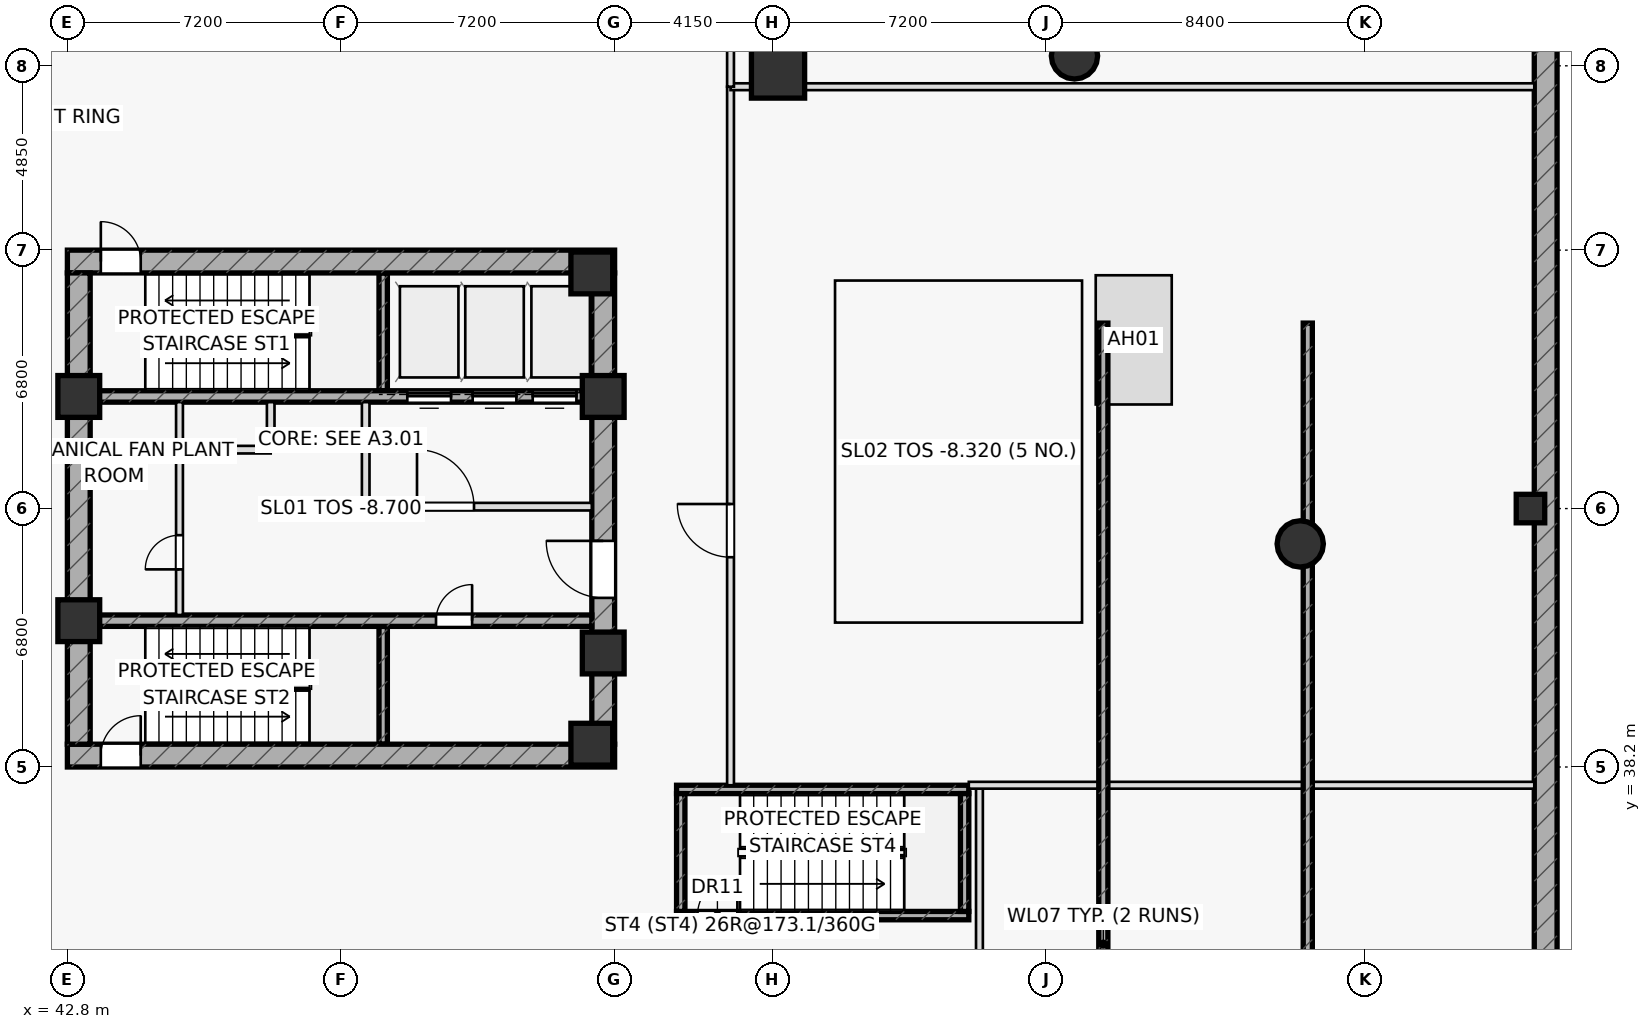
"""IFC4 building model, lengths in metres.
Left out: names, types, materials, properties, quantities, classifications, styles, units other than length and angle.
Written with IfcOpenShell. Run it as: python <this file> out.ifc"""

import sys

from ifc_helpers import new_model, si_unit, direction, frame, frame_2d, origin, origin_2d, place, context, subcontext, project, spatial, rectangle, hollow_circle, extrude, element, fill, save


model = new_model("IFC4")
c1 = context("Model", 3, precision=1e-05, world=origin(), true_north=direction((0.0, 1.0)))
c2 = subcontext(c1, "Body", "Model", "MODEL_VIEW")
j1 = project(units=[si_unit("LENGTHUNIT", "METRE"), si_unit("PLANEANGLEUNIT", "RADIAN")], contexts=[c1])
p1 = place(None, origin())
s1 = spatial("IfcSite", under=j1, at=p1, CompositionType="ELEMENT")
p2 = place(p1, origin())
s2 = spatial("IfcBuilding", under=s1, at=p2, CompositionType="ELEMENT")
p3 = place(p2, frame((0.0, 0.0, -8.7)))
s3 = spatial("IfcBuildingStorey", under=s2, at=p3, CompositionType="ELEMENT", Elevation=-8.7)
for number, where, z_axis, x_axis in (
    (1, (51.11, 48.1, 0.0), (0.0, 0.0, 1.0), (0.0, 1.0, 0.0)),
    (2, (51.11, 38.8, 0.0), (0.0, 0.0, 1.0), (0.0, 1.0, 0.0)),
):
    element("IfcWall", number, at=place(p3, frame(where, z_axis=z_axis, x_axis=x_axis)), inside=s3, PredefinedType="SHEAR", context=c2, shape_type="SweptSolid", body=[
        extrude(rectangle(XDim=3.1, YDim=0.22, at=frame_2d((1.55, 0.0))), origin(), (0.0, 0.0, 1.0), 4.15),
    ])
p4 = place(p3, frame((58.83, 34.29, 0.0), z_axis=(0.0, 0.0, 1.0), x_axis=(1.0, 0.0, 0.0)))
e3 = element("IfcWall", 3, at=p4, inside=s3, PredefinedType="SHEAR", context=c2, shape_type="SweptSolid", body=[
    extrude(rectangle(XDim=7.69, YDim=0.22, at=frame_2d((3.845, 0.0))), origin(), (0.0, 0.0, 1.0), 4.15),
])
p5 = place(p4, frame((0.55, 0.0, 0.0)))
e4 = element("IfcOpeningElement", 4, at=p5, cuts=e3, PredefinedType="OPENING", context=c2, shape_type="SweptSolid", body=[
    extrude(rectangle(XDim=1.05, YDim=2.2, at=frame_2d((0.525, 1.1))), frame((0.0, 0.12, 0.0), z_axis=(0.0, -1.0, 0.0), x_axis=(1.0, 0.0, 0.0)), (0.0, 0.0, 1.0), 0.24),
])
p6 = place(p3, frame((58.83, 37.61, 0.0), z_axis=(0.0, 0.0, 1.0), x_axis=(1.0, 0.0, 0.0)))
e5 = element("IfcWall", 5, at=p6, inside=s3, PredefinedType="SHEAR", context=c2, shape_type="SweptSolid", body=[
    extrude(rectangle(XDim=7.69, YDim=0.22, at=frame_2d((3.845, 0.0))), origin(), (0.0, 0.0, 1.0), 4.15),
])
for number, where, z_axis, x_axis in (
    (6, (66.41, 34.4, 0.0), (0.0, 0.0, 1.0), (0.0, 1.0, 0.0)),
    (7, (58.94, 34.4, 0.0), (0.0, 0.0, 1.0), (0.0, 1.0, 0.0)),
):
    element("IfcWall", number, at=place(p3, frame(where, z_axis=z_axis, x_axis=x_axis)), inside=s3, PredefinedType="SHEAR", context=c2, shape_type="SweptSolid", body=[
        extrude(rectangle(XDim=3.1, YDim=0.22, at=frame_2d((1.55, 0.0))), origin(), (0.0, 0.0, 1.0), 4.15),
    ])
p7 = place(p3, frame((42.8, 51.5, 0.0), z_axis=(0.0, 0.0, 1.0), x_axis=(1.0, 0.0, 0.0)))
e8 = element("IfcWall", 8, at=p7, inside=s3, PredefinedType="SHEAR", context=c2, shape_type="SweptSolid", body=[
    extrude(rectangle(XDim=14.4, YDim=0.6, at=frame_2d((7.2, 0.0))), origin(), (0.0, 0.0, 1.0), 4.15),
])
p8 = place(p7, frame((0.88, 0.0, 0.0)))
e9 = element("IfcOpeningElement", 9, at=p8, cuts=e8, PredefinedType="OPENING", context=c2, shape_type="SweptSolid", body=[
    extrude(rectangle(XDim=1.05, YDim=2.2, at=frame_2d((0.525, 1.1))), frame((0.0, 0.31, 0.0), z_axis=(0.0, -1.0, 0.0), x_axis=(1.0, 0.0, 0.0)), (0.0, 0.0, 1.0), 0.62),
])
p9 = place(p3, frame((42.8, 38.5, 0.0), z_axis=(0.0, 0.0, 1.0), x_axis=(1.0, 0.0, 0.0)))
e10 = element("IfcWall", 10, at=p9, inside=s3, PredefinedType="SHEAR", context=c2, shape_type="SweptSolid", body=[
    extrude(rectangle(XDim=14.4, YDim=0.6, at=frame_2d((7.2, 0.0))), origin(), (0.0, 0.0, 1.0), 4.15),
])
p10 = place(p9, frame((0.88, 0.0, 0.0)))
e11 = element("IfcOpeningElement", 11, at=p10, cuts=e10, PredefinedType="OPENING", context=c2, shape_type="SweptSolid", body=[
    extrude(rectangle(XDim=1.05, YDim=2.2, at=frame_2d((0.525, 1.1))), frame((0.0, 0.31, 0.0), z_axis=(0.0, -1.0, 0.0), x_axis=(1.0, 0.0, 0.0)), (0.0, 0.0, 1.0), 0.62),
])
p11 = place(p3, frame((43.1, 38.8, 0.0), z_axis=(0.0, 0.0, 1.0), x_axis=(0.0, 1.0, 0.0)))
e12 = element("IfcWall", 12, at=p11, inside=s3, PredefinedType="SHEAR", context=c2, shape_type="SweptSolid", body=[
    extrude(rectangle(XDim=12.4, YDim=0.6, at=frame_2d((6.2, 0.0))), origin(), (0.0, 0.0, 1.0), 4.15),
])
p12 = place(p3, frame((56.9, 38.8, 0.0), z_axis=(0.0, 0.0, 1.0), x_axis=(0.0, 1.0, 0.0)))
e13 = element("IfcWall", 13, at=p12, inside=s3, PredefinedType="SHEAR", context=c2, shape_type="SweptSolid", body=[
    extrude(rectangle(XDim=12.4, YDim=0.6, at=frame_2d((6.2, 0.0))), origin(), (0.0, 0.0, 1.0), 4.15),
])
p13 = place(p12, frame((3.85, 0.0, 0.0)))
e14 = element("IfcOpeningElement", 14, at=p13, cuts=e13, PredefinedType="OPENING", context=c2, shape_type="SweptSolid", body=[
    extrude(rectangle(XDim=1.5, YDim=2.2, at=frame_2d((0.75, 1.1))), frame((0.0, 0.31, 0.0), z_axis=(0.0, -1.0, 0.0), x_axis=(1.0, 0.0, 0.0)), (0.0, 0.0, 1.0), 0.62),
])
p14 = place(p3, frame((43.4, 47.95, 0.0), z_axis=(0.0, 0.0, 1.0), x_axis=(1.0, 0.0, 0.0)))
e15 = element("IfcWall", 15, at=p14, inside=s3, PredefinedType="SHEAR", context=c2, shape_type="SweptSolid", body=[
    extrude(rectangle(XDim=13.2, YDim=0.3, at=frame_2d((6.6, 0.0))), origin(), (0.0, 0.0, 1.0), 4.15),
])
p15 = place(p14, frame((8.345, 0.0, 0.0)))
e16 = element("IfcOpeningElement", 16, at=p15, cuts=e15, PredefinedType="OPENING", context=c2, shape_type="SweptSolid", body=[
    extrude(rectangle(XDim=1.15, YDim=2.2, at=frame_2d((0.575, 1.1))), frame((0.0, 0.16, 0.0), z_axis=(0.0, -1.0, 0.0), x_axis=(1.0, 0.0, 0.0)), (0.0, 0.0, 1.0), 0.32),
])
p16 = place(p14, frame((10.065, 0.0, 0.0)))
e17 = element("IfcOpeningElement", 17, at=p16, cuts=e15, PredefinedType="OPENING", context=c2, shape_type="SweptSolid", body=[
    extrude(rectangle(XDim=1.15, YDim=2.2, at=frame_2d((0.575, 1.1))), frame((0.0, 0.16, 0.0), z_axis=(0.0, -1.0, 0.0), x_axis=(1.0, 0.0, 0.0)), (0.0, 0.0, 1.0), 0.32),
])
p17 = place(p14, frame((11.645, 0.0, 0.0)))
e18 = element("IfcOpeningElement", 18, at=p17, cuts=e15, PredefinedType="OPENING", context=c2, shape_type="SweptSolid", body=[
    extrude(rectangle(XDim=1.15, YDim=2.2, at=frame_2d((0.575, 1.1))), frame((0.0, 0.16, 0.0), z_axis=(0.0, -1.0, 0.0), x_axis=(1.0, 0.0, 0.0)), (0.0, 0.0, 1.0), 0.32),
])
p18 = place(p3, frame((43.4, 42.05, 0.0), z_axis=(0.0, 0.0, 1.0), x_axis=(1.0, 0.0, 0.0)))
e19 = element("IfcWall", 19, at=p18, inside=s3, PredefinedType="SHEAR", context=c2, shape_type="SweptSolid", body=[
    extrude(rectangle(XDim=13.2, YDim=0.3, at=frame_2d((6.6, 0.0))), origin(), (0.0, 0.0, 1.0), 4.15),
])
p19 = place(p18, frame((9.1, 0.0, 0.0)))
e20 = element("IfcOpeningElement", 20, at=p19, cuts=e19, PredefinedType="OPENING", context=c2, shape_type="SweptSolid", body=[
    extrude(rectangle(XDim=0.95, YDim=2.05, at=frame_2d((0.475, 1.025))), frame((0.0, 0.16, 0.0), z_axis=(0.0, -1.0, 0.0), x_axis=(1.0, 0.0, 0.0)), (0.0, 0.0, 1.0), 0.32),
])
for number, where, z_axis, x_axis in (
    (21, (43.1, 47.95, 0.0), (0.0, 0.0, 1.0), (1.0, 0.0, 0.0)),
    (22, (56.9, 47.95, 0.0), (0.0, 0.0, 1.0), (1.0, 0.0, 0.0)),
    (23, (56.6, 51.2, 0.0), (0.0, 0.0, 1.0), (1.0, 0.0, 0.0)),
    (24, (43.1, 42.05, 0.0), (0.0, 0.0, 1.0), (1.0, 0.0, 0.0)),
    (25, (56.9, 41.2, 0.0), (0.0, 0.0, 1.0), (1.0, 0.0, 0.0)),
    (26, (56.6, 38.8, 0.0), (0.0, 0.0, 1.0), (1.0, 0.0, 0.0)),
):
    element("IfcColumn", number, at=place(p3, frame(where, z_axis=z_axis, x_axis=x_axis)), inside=s3, PredefinedType="COLUMN", context=c2, shape_type="SweptSolid", body=[
        extrude(rectangle(XDim=1.1, YDim=1.1, at=origin_2d()), origin(), (0.0, 0.0, 1.0), 4.15),
    ])
p20 = place(p3, frame((81.7, 16.6, 0.0), z_axis=(0.0, 0.0, 1.0), x_axis=(0.0, 1.0, 0.0)))
e27 = element("IfcWall", 27, at=p20, inside=s3, PredefinedType="USERDEFINED", context=c2, shape_type="SweptSolid", body=[
    extrude(rectangle(XDim=56.8, YDim=0.6, at=frame_2d((28.4, 0.0))), origin(), (0.0, 0.0, 1.0), 4.15),
])
p21 = place(p3, frame((81.3, 45.0, 0.0), z_axis=(0.0, 0.0, 1.0), x_axis=(1.0, 0.0, 0.0)))
e28 = element("IfcColumn", 28, at=p21, inside=s3, PredefinedType="PILASTER", context=c2, shape_type="SweptSolid", body=[
    extrude(rectangle(XDim=0.75, YDim=0.75, at=origin_2d()), origin(), (0.0, 0.0, 1.0), 4.15),
])
p22 = place(p3, frame((61.5, 56.5, 0.0), z_axis=(0.0, 0.0, 1.0), x_axis=(1.0, 0.0, 0.0)))
e29 = element("IfcColumn", 29, at=p22, inside=s3, PredefinedType="COLUMN", context=c2, shape_type="SweptSolid", body=[
    extrude(rectangle(XDim=1.4, YDim=1.4, at=origin_2d()), origin(), (0.0, 0.0, 1.0), 4.15),
])
for number, where, z_axis, x_axis in (
    (30, (75.241, 44.07, 0.0), (0.0, 0.0, 1.0), (1.0, 0.0, 0.0)),
    (31, (69.301, 56.911, 0.0), (0.0, 0.0, 1.0), (1.0, 0.0, 0.0)),
):
    element("IfcColumn", number, at=place(p3, frame(where, z_axis=z_axis, x_axis=x_axis)), inside=s3, PredefinedType="COLUMN", context=c2, shape_type="SweptSolid", body=[
        extrude(hollow_circle(Radius=0.61, WallThickness=0.05, at=origin_2d()), origin(), (0.0, 0.0, 1.0), 4.15),
    ])
p23 = place(p3, frame((45.75, 46.55, 0.0), z_axis=(0.0, 0.0, 1.0), x_axis=(1.0, 0.0, 0.0)))
e32 = element("IfcWall", 32, at=p23, inside=s3, PredefinedType="PARTITIONING", context=c2, shape_type="SweptSolid", body=[
    extrude(rectangle(XDim=2.4, YDim=0.2, at=frame_2d((1.2, 0.0))), origin(), (0.0, 0.0, 1.0), 4.15),
])
p24 = place(p3, frame((48.15, 46.55, 0.0), z_axis=(0.0, 0.0, 1.0), x_axis=(0.0, 1.0, 0.0)))
e33 = element("IfcWall", 33, at=p24, inside=s3, PredefinedType="PARTITIONING", context=c2, shape_type="SweptSolid", body=[
    extrude(rectangle(XDim=1.25, YDim=0.2, at=frame_2d((0.625, 0.0))), origin(), (0.0, 0.0, 1.0), 4.15),
])
p25 = place(p3, frame((50.65, 45.05, 0.0), z_axis=(0.0, 0.0, 1.0), x_axis=(1.0, 0.0, 0.0)))
e34 = element("IfcWall", 34, at=p25, inside=s3, PredefinedType="PARTITIONING", context=c2, shape_type="SweptSolid", body=[
    extrude(rectangle(XDim=5.95, YDim=0.2, at=frame_2d((2.975, 0.0))), origin(), (0.0, 0.0, 1.0), 4.15),
])
p26 = place(p25, frame((1.35, 0.0, 0.0)))
e35 = element("IfcOpeningElement", 35, at=p26, cuts=e34, PredefinedType="OPENING", context=c2, shape_type="SweptSolid", body=[
    extrude(rectangle(XDim=1.5, YDim=2.2, at=frame_2d((0.75, 1.1))), frame((0.0, 0.11, 0.0), z_axis=(0.0, -1.0, 0.0), x_axis=(1.0, 0.0, 0.0)), (0.0, 0.0, 1.0), 0.22),
])
p27 = place(p3, frame((50.65, 45.05, 0.0), z_axis=(0.0, 0.0, 1.0), x_axis=(0.0, 1.0, 0.0)))
e36 = element("IfcWall", 36, at=p27, inside=s3, PredefinedType="PARTITIONING", context=c2, shape_type="SweptSolid", body=[
    extrude(rectangle(XDim=2.75, YDim=0.2, at=frame_2d((1.375, 0.0))), origin(), (0.0, 0.0, 1.0), 4.15),
])
p28 = place(p3, frame((45.75, 42.2, 0.0), z_axis=(0.0, 0.0, 1.0), x_axis=(0.0, 1.0, 0.0)))
e37 = element("IfcWall", 37, at=p28, inside=s3, PredefinedType="PARTITIONING", context=c2, shape_type="SweptSolid", body=[
    extrude(rectangle(XDim=5.6, YDim=0.18, at=frame_2d((2.8, 0.0))), origin(), (0.0, 0.0, 1.0), 4.15),
])
p29 = place(p28, frame((1.2, 0.0, 0.0)))
e38 = element("IfcOpeningElement", 38, at=p29, cuts=e37, PredefinedType="OPENING", context=c2, shape_type="SweptSolid", body=[
    extrude(rectangle(XDim=0.9, YDim=2.05, at=frame_2d((0.45, 1.025))), frame((0.0, 0.1, 0.0), z_axis=(0.0, -1.0, 0.0), x_axis=(1.0, 0.0, 0.0)), (0.0, 0.0, 1.0), 0.2),
])
p30 = place(p3, frame((66.8, 31.15, 0.0), z_axis=(0.0, 0.0, 1.0), x_axis=(0.0, 1.0, 0.0)))
e39 = element("IfcWall", 39, at=p30, inside=s3, PredefinedType="PARTITIONING", context=c2, shape_type="SweptSolid", body=[
    extrude(rectangle(XDim=6.57, YDim=0.18, at=frame_2d((3.285, 0.0))), origin(), (0.0, 0.0, 1.0), 3.275),
])
p31 = place(p3, frame((66.52, 37.72, 0.0), z_axis=(0.0, 0.0, 1.0), x_axis=(1.0, 0.0, 0.0)))
e40 = element("IfcWall", 40, at=p31, inside=s3, PredefinedType="PARTITIONING", context=c2, shape_type="SweptSolid", body=[
    extrude(rectangle(XDim=14.88, YDim=0.18, at=frame_2d((7.44, 0.0))), origin(), (0.0, 0.0, 1.0), 3.175),
])
p32 = place(p3, frame((60.25, 37.72, 0.0), z_axis=(0.0, 0.0, 1.0), x_axis=(0.0, 1.0, 0.0)))
e41 = element("IfcWall", 41, at=p32, inside=s3, PredefinedType="PARTITIONING", context=c2, shape_type="SweptSolid", body=[
    extrude(rectangle(XDim=18.38, YDim=0.18, at=frame_2d((9.19, 0.0))), origin(), (0.0, 0.0, 1.0), 3.175),
])
p33 = place(p32, frame((6.0, 0.0, 0.0)))
e42 = element("IfcOpeningElement", 42, at=p33, cuts=e41, PredefinedType="OPENING", context=c2, shape_type="SweptSolid", body=[
    extrude(rectangle(XDim=1.4, YDim=2.15, at=frame_2d((0.7, 1.075))), frame((0.0, 0.1, 0.0), z_axis=(0.0, -1.0, 0.0), x_axis=(1.0, 0.0, 0.0)), (0.0, 0.0, 1.0), 0.2),
])
p34 = place(p3, frame((60.25, 56.1, 0.0), z_axis=(0.0, 0.0, 1.0), x_axis=(1.0, 0.0, 0.0)))
e43 = element("IfcWall", 43, at=p34, inside=s3, PredefinedType="PARTITIONING", context=c2, shape_type="SweptSolid", body=[
    extrude(rectangle(XDim=21.15, YDim=0.18, at=frame_2d((10.575, 0.0))), origin(), (0.0, 0.0, 1.0), 3.175),
])
p35 = place(p3, frame((60.25, 56.1, 0.0), z_axis=(0.0, 0.0, 1.0), x_axis=(0.0, 1.0, 0.0)))
e44 = element("IfcWall", 44, at=p35, inside=s3, PredefinedType="PARTITIONING", context=c2, shape_type="SweptSolid", body=[
    extrude(rectangle(XDim=17.3, YDim=0.18, at=frame_2d((8.65, 0.0))), origin(), (0.0, 0.0, 1.0), 3.175),
])
p36 = place(p35, frame((1.25, 0.0, 0.0)))
e45 = element("IfcOpeningElement", 45, at=p36, cuts=e44, PredefinedType="OPENING", context=c2, shape_type="SweptSolid", body=[
    extrude(rectangle(XDim=1.4, YDim=2.15, at=frame_2d((0.7, 1.075))), frame((0.0, 0.1, 0.0), z_axis=(0.0, -1.0, 0.0), x_axis=(1.0, 0.0, 0.0)), (0.0, 0.0, 1.0), 0.2),
])
for number, where, z_axis, x_axis in (
    (46, (70.06, 17.2, 0.0), (0.0, 0.0, 1.0), (0.0, 1.0, 0.0)),
    (47, (75.44, 17.2, 0.0), (0.0, 0.0, 1.0), (0.0, 1.0, 0.0)),
):
    element("IfcWall", number, at=place(p3, frame(where, z_axis=z_axis, x_axis=x_axis)), inside=s3, PredefinedType="SHEAR", context=c2, shape_type="SweptSolid", body=[
        extrude(rectangle(XDim=32.68, YDim=0.24, at=frame_2d((16.34, 0.0))), origin(), (0.0, 0.0, 1.0), 4.15),
    ])
p37 = place(p8, origin())
e48 = element("IfcDoor", 48, at=p37, inside=s3, OperationType="SINGLE_SWING_LEFT", PredefinedType="DOOR", context=c2, shape_type="SweptSolid", body=[
    extrude(rectangle(XDim=1.05, YDim=2.2, at=frame_2d((0.525, 1.1))), frame((0.0, 0.025, 0.0), z_axis=(0.0, -1.0, 0.0), x_axis=(1.0, 0.0, 0.0)), (0.0, 0.0, 1.0), 0.05),
])
fill(e9, e48)
p38 = place(p10, origin())
e49 = element("IfcDoor", 49, at=p38, inside=s3, OperationType="SINGLE_SWING_RIGHT", PredefinedType="DOOR", context=c2, shape_type="SweptSolid", body=[
    extrude(rectangle(XDim=1.05, YDim=2.2, at=frame_2d((0.525, 1.1))), frame((0.0, 0.025, 0.0), z_axis=(0.0, -1.0, 0.0), x_axis=(1.0, 0.0, 0.0)), (0.0, 0.0, 1.0), 0.05),
])
fill(e11, e49)
p39 = place(p13, origin())
e50 = element("IfcDoor", 50, at=p39, inside=s3, OperationType="SINGLE_SWING_RIGHT", PredefinedType="DOOR", context=c2, shape_type="SweptSolid", body=[
    extrude(rectangle(XDim=1.5, YDim=2.2, at=frame_2d((0.75, 1.1))), frame((0.0, 0.025, 0.0), z_axis=(0.0, -1.0, 0.0), x_axis=(1.0, 0.0, 0.0)), (0.0, 0.0, 1.0), 0.05),
])
fill(e14, e50)
p40 = place(p26, origin())
e51 = element("IfcDoor", 51, at=p40, inside=s3, OperationType="SINGLE_SWING_LEFT", PredefinedType="DOOR", context=c2, shape_type="SweptSolid", body=[
    extrude(rectangle(XDim=1.5, YDim=2.2, at=frame_2d((0.75, 1.1))), frame((0.0, 0.025, 0.0), z_axis=(0.0, -1.0, 0.0), x_axis=(1.0, 0.0, 0.0)), (0.0, 0.0, 1.0), 0.05),
])
fill(e35, e51)
p41 = place(p5, origin())
e52 = element("IfcDoor", 52, at=p41, inside=s3, OperationType="SINGLE_SWING_RIGHT", PredefinedType="DOOR", context=c2, shape_type="SweptSolid", body=[
    extrude(rectangle(XDim=1.05, YDim=2.2, at=frame_2d((0.525, 1.1))), frame((0.0, 0.025, 0.0), z_axis=(0.0, -1.0, 0.0), x_axis=(1.0, 0.0, 0.0)), (0.0, 0.0, 1.0), 0.05),
])
fill(e4, e52)
p42 = place(p19, origin())
e53 = element("IfcDoor", 53, at=p42, inside=s3, OperationType="SINGLE_SWING_RIGHT", PredefinedType="DOOR", context=c2, shape_type="SweptSolid", body=[
    extrude(rectangle(XDim=0.95, YDim=2.05, at=frame_2d((0.475, 1.025))), frame((0.0, 0.025, 0.0), z_axis=(0.0, -1.0, 0.0), x_axis=(1.0, 0.0, 0.0)), (0.0, 0.0, 1.0), 0.05),
])
fill(e20, e53)
p43 = place(p29, origin())
e54 = element("IfcDoor", 54, at=p43, inside=s3, OperationType="SINGLE_SWING_LEFT", PredefinedType="DOOR", context=c2, shape_type="SweptSolid", body=[
    extrude(rectangle(XDim=0.9, YDim=2.05, at=frame_2d((0.45, 1.025))), frame((0.0, 0.025, 0.0), z_axis=(0.0, -1.0, 0.0), x_axis=(1.0, 0.0, 0.0)), (0.0, 0.0, 1.0), 0.05),
])
fill(e38, e54)
p44 = place(p33, origin())
e55 = element("IfcDoor", 55, at=p44, inside=s3, OperationType="SINGLE_SWING_RIGHT", PredefinedType="DOOR", context=c2, shape_type="SweptSolid", body=[
    extrude(rectangle(XDim=1.4, YDim=2.15, at=frame_2d((0.7, 1.075))), frame((0.0, 0.025, 0.0), z_axis=(0.0, -1.0, 0.0), x_axis=(1.0, 0.0, 0.0)), (0.0, 0.0, 1.0), 0.05),
])
fill(e42, e55)
p45 = place(p15, origin())
e56 = element("IfcDoor", 56, at=p45, inside=s3, OperationType="SLIDING_TO_LEFT", PredefinedType="DOOR", context=c2, shape_type="SweptSolid", body=[
    extrude(rectangle(XDim=1.15, YDim=2.2, at=frame_2d((0.575, 1.1))), frame((0.0, 0.025, 0.0), z_axis=(0.0, -1.0, 0.0), x_axis=(1.0, 0.0, 0.0)), (0.0, 0.0, 1.0), 0.05),
])
fill(e16, e56)
p46 = place(p16, origin())
e57 = element("IfcDoor", 57, at=p46, inside=s3, OperationType="SLIDING_TO_LEFT", PredefinedType="DOOR", context=c2, shape_type="SweptSolid", body=[
    extrude(rectangle(XDim=1.15, YDim=2.2, at=frame_2d((0.575, 1.1))), frame((0.0, 0.025, 0.0), z_axis=(0.0, -1.0, 0.0), x_axis=(1.0, 0.0, 0.0)), (0.0, 0.0, 1.0), 0.05),
])
fill(e17, e57)
p47 = place(p17, origin())
e58 = element("IfcDoor", 58, at=p47, inside=s3, OperationType="SLIDING_TO_LEFT", PredefinedType="DOOR", context=c2, shape_type="SweptSolid", body=[
    extrude(rectangle(XDim=1.15, YDim=2.2, at=frame_2d((0.575, 1.1))), frame((0.0, 0.025, 0.0), z_axis=(0.0, -1.0, 0.0), x_axis=(1.0, 0.0, 0.0)), (0.0, 0.0, 1.0), 0.05),
])
fill(e18, e58)
save(model, sys.argv[1])
